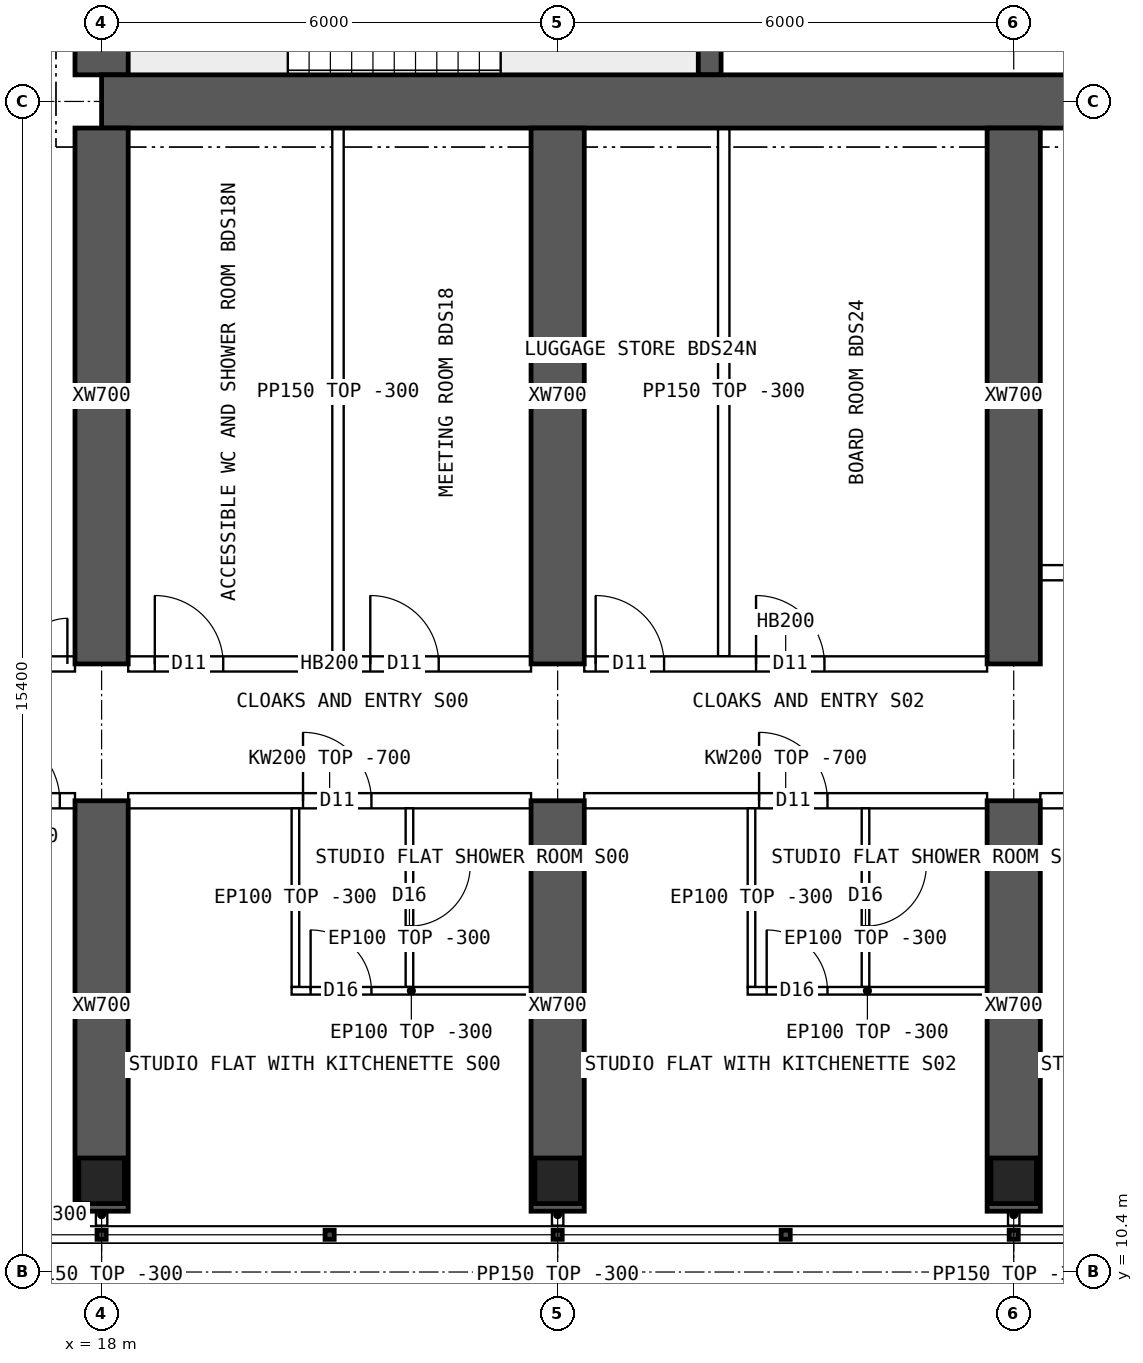
"""IFC4 building model, lengths in metres.
Left out: names, types, materials, properties, quantities, classifications, styles, units other than length and angle.
Written with IfcOpenShell. Run it as: python <this file> out.ifc"""

import sys

from ifc_helpers import new_model, si_unit, direction, frame, frame_2d, origin, origin_2d, place, context, subcontext, project, spatial, polyline, rectangle, hollow_rectangle, outline, extrude, element, fill, save


model = new_model("IFC4")
c1 = context("Model", 3, precision=1e-05, world=origin(), true_north=direction((0.0, 1.0)))
c2 = subcontext(c1, "Body", "Model", "MODEL_VIEW")
j1 = project(units=[si_unit("LENGTHUNIT", "METRE"), si_unit("PLANEANGLEUNIT", "RADIAN")], contexts=[c1])
p1 = place(None, origin())
s1 = spatial("IfcSite", under=j1, at=p1, CompositionType="ELEMENT")
p2 = place(p1, origin())
s2 = spatial("IfcBuilding", under=s1, at=p2, CompositionType="ELEMENT")
p3 = place(p2, frame((0.0, 0.0, 254.05)))
s3 = spatial("IfcBuildingStorey", under=s2, at=p3, CompositionType="ELEMENT", Elevation=254.05)
for number, where, z_axis, x_axis in (
    (1, (18.0, 11.6, 0.0), (0.0, 0.0, 1.0), (1.0, 0.0, 0.0)),
    (2, (24.0, 11.6, 0.0), (0.0, 0.0, 1.0), (1.0, 0.0, 0.0)),
    (3, (30.0, 11.6, 0.0), (0.0, 0.0, 1.0), (1.0, 0.0, 0.0)),
):
    element("IfcColumn", number, at=place(p3, frame(where, z_axis=z_axis, x_axis=x_axis)), inside=s3, PredefinedType="COLUMN", context=c2, shape_type="SweptSolid", body=[
        extrude(hollow_rectangle(XDim=0.6, YDim=0.6, WallThickness=0.06, at=origin_2d()), origin(), (0.0, 0.0, 1.0), 3.75),
    ])
p4 = place(p3, frame((18.0, 25.8, 0.0), z_axis=(0.0, 0.0, 1.0), x_axis=(1.0, 0.0, 0.0)))
e4 = element("IfcWall", 4, at=p4, inside=s3, PredefinedType="SHEAR", context=c2, shape_type="SweptSolid", body=[
    extrude(rectangle(XDim=48.0, YDim=0.7, at=frame_2d((24.0, 0.0))), origin(), (0.0, 0.0, 1.0), 3.75),
])
p5 = place(p3, frame((18.0, 26.15, 0.0), z_axis=(0.0, 0.0, 1.0), x_axis=(0.0, 1.0, 0.0)))
e5 = element("IfcWall", 5, at=p5, inside=s3, PredefinedType="SHEAR", context=c2, shape_type="SweptSolid", body=[
    extrude(rectangle(XDim=11.7, YDim=0.7, at=frame_2d((5.85, 0.0))), origin(), (0.0, 0.0, 1.0), 3.75),
])
p6 = place(p5, frame((5.15, 0.0, 0.0)))
e6 = element("IfcOpeningElement", 6, at=p6, cuts=e5, PredefinedType="OPENING", context=c2, shape_type="SweptSolid", body=[
    extrude(rectangle(XDim=1.2, YDim=2.1, at=frame_2d((0.6, 1.05))), frame((0.0, 0.36, 0.0), z_axis=(0.0, -1.0, 0.0), x_axis=(1.0, 0.0, 0.0)), (0.0, 0.0, 1.0), 0.72),
])
p7 = place(p3, frame((26.0, 26.15, 0.0), z_axis=(0.0, 0.0, 1.0), x_axis=(0.0, 1.0, 0.0)))
e7 = element("IfcWall", 7, at=p7, inside=s3, PredefinedType="SHEAR", context=c2, shape_type="SweptSolid", body=[
    extrude(rectangle(XDim=4.1, YDim=0.3, at=frame_2d((2.05, 0.0))), origin(), (0.0, 0.0, 1.0), 3.75),
])
p8 = place(p3, frame((18.0, 11.2, 0.0), z_axis=(0.0, 0.0, 1.0), x_axis=(0.0, 1.0, 0.0)))
e8 = element("IfcWall", 8, at=p8, inside=s3, PredefinedType="SHEAR", context=c2, shape_type="SweptSolid", body=[
    extrude(rectangle(XDim=5.4, YDim=0.7, at=frame_2d((2.7, 0.0))), origin(), (0.0, 0.0, 1.0), 3.75),
])
p9 = place(p3, frame((18.0, 18.4, 0.0), z_axis=(0.0, 0.0, 1.0), x_axis=(0.0, 1.0, 0.0)))
e9 = element("IfcWall", 9, at=p9, inside=s3, PredefinedType="SHEAR", context=c2, shape_type="SweptSolid", body=[
    extrude(rectangle(XDim=7.05, YDim=0.7, at=frame_2d((3.525, 0.0))), origin(), (0.0, 0.0, 1.0), 3.75),
])
p10 = place(p3, frame((24.0, 11.2, 0.0), z_axis=(0.0, 0.0, 1.0), x_axis=(0.0, 1.0, 0.0)))
e10 = element("IfcWall", 10, at=p10, inside=s3, PredefinedType="SHEAR", context=c2, shape_type="SweptSolid", body=[
    extrude(rectangle(XDim=5.4, YDim=0.7, at=frame_2d((2.7, 0.0))), origin(), (0.0, 0.0, 1.0), 3.75),
])
p11 = place(p3, frame((24.0, 18.4, 0.0), z_axis=(0.0, 0.0, 1.0), x_axis=(0.0, 1.0, 0.0)))
e11 = element("IfcWall", 11, at=p11, inside=s3, PredefinedType="SHEAR", context=c2, shape_type="SweptSolid", body=[
    extrude(rectangle(XDim=7.05, YDim=0.7, at=frame_2d((3.525, 0.0))), origin(), (0.0, 0.0, 1.0), 3.75),
])
p12 = place(p3, frame((30.0, 11.2, 0.0), z_axis=(0.0, 0.0, 1.0), x_axis=(0.0, 1.0, 0.0)))
e12 = element("IfcWall", 12, at=p12, inside=s3, PredefinedType="SHEAR", context=c2, shape_type="SweptSolid", body=[
    extrude(rectangle(XDim=5.4, YDim=0.7, at=frame_2d((2.7, 0.0))), origin(), (0.0, 0.0, 1.0), 3.75),
])
p13 = place(p3, frame((30.0, 18.4, 0.0), z_axis=(0.0, 0.0, 1.0), x_axis=(0.0, 1.0, 0.0)))
e13 = element("IfcWall", 13, at=p13, inside=s3, PredefinedType="SHEAR", context=c2, shape_type="SweptSolid", body=[
    extrude(rectangle(XDim=7.05, YDim=0.7, at=frame_2d((3.525, 0.0))), origin(), (0.0, 0.0, 1.0), 3.75),
])
p14 = place(p3, frame((17.2, 11.15, 0.0), z_axis=(0.0, 0.0, 1.0), x_axis=(1.0, 0.0, 0.0)))
e14 = element("IfcWall", 14, at=p14, inside=s3, PredefinedType="SOLIDWALL", context=c2, shape_type="SweptSolid", body=[
    extrude(rectangle(XDim=0.45, YDim=0.3, at=frame_2d((0.225, 0.0))), origin(), (0.0, 0.0, 1.0), 3.45),
])
p15 = place(p3, frame((15.6, 16.6, 0.0), z_axis=(0.0, 0.0, 1.0), x_axis=(1.0, 0.0, 0.0)))
e15 = element("IfcWall", 15, at=p15, inside=s3, PredefinedType="SOLIDWALL", context=c2, shape_type="SweptSolid", body=[
    extrude(rectangle(XDim=2.05, YDim=0.2, at=frame_2d((1.025, 0.0))), origin(), (0.0, 0.0, 1.0), 3.45),
])
p16 = place(p15, frame((0.95, 0.0, 0.0)))
e16 = element("IfcOpeningElement", 16, at=p16, cuts=e15, PredefinedType="OPENING", context=c2, shape_type="SweptSolid", body=[
    extrude(rectangle(XDim=0.9, YDim=2.1, at=frame_2d((0.45, 1.05))), frame((0.0, 0.11, 0.0), z_axis=(0.0, -1.0, 0.0), x_axis=(1.0, 0.0, 0.0)), (0.0, 0.0, 1.0), 0.22),
])
p17 = place(p3, frame((15.6, 18.4, 0.0), z_axis=(0.0, 0.0, 1.0), x_axis=(1.0, 0.0, 0.0)))
e17 = element("IfcWall", 17, at=p17, inside=s3, PredefinedType="SOLIDWALL", context=c2, shape_type="SweptSolid", body=[
    extrude(rectangle(XDim=2.05, YDim=0.2, at=frame_2d((1.025, 0.0))), origin(), (0.0, 0.0, 1.0), 3.45),
])
p18 = place(p17, frame((0.75, 0.0, 0.0)))
e18 = element("IfcOpeningElement", 18, at=p18, cuts=e17, PredefinedType="OPENING", context=c2, shape_type="SweptSolid", body=[
    extrude(rectangle(XDim=1.2, YDim=2.1, at=frame_2d((0.6, 1.05))), frame((0.0, 0.11, 0.0), z_axis=(0.0, -1.0, 0.0), x_axis=(1.0, 0.0, 0.0)), (0.0, 0.0, 1.0), 0.22),
])
p19 = place(p3, frame((18.35, 16.6, 0.0), z_axis=(0.0, 0.0, 1.0), x_axis=(1.0, 0.0, 0.0)))
e19 = element("IfcWall", 19, at=p19, inside=s3, PredefinedType="SOLIDWALL", context=c2, shape_type="SweptSolid", body=[
    extrude(outline(polyline([(0.0, 0.0), (5.3, 0.0), (5.3, 3.05), (0.0, 3.05), (0.0, 0.0)])), frame((0.0, 0.1, 0.0), z_axis=(0.0, -1.0, 0.0), x_axis=(1.0, 0.0, 0.0)), (0.0, 0.0, 1.0), 0.2),
])
p20 = place(p19, frame((2.3, 0.0, 0.0)))
e20 = element("IfcOpeningElement", 20, at=p20, cuts=e19, PredefinedType="OPENING", context=c2, shape_type="SweptSolid", body=[
    extrude(rectangle(XDim=0.9, YDim=2.1, at=frame_2d((0.45, 1.05))), frame((0.0, 0.11, 0.0), z_axis=(0.0, -1.0, 0.0), x_axis=(1.0, 0.0, 0.0)), (0.0, 0.0, 1.0), 0.22),
])
p21 = place(p3, frame((18.35, 18.4, 0.0), z_axis=(0.0, 0.0, 1.0), x_axis=(1.0, 0.0, 0.0)))
e21 = element("IfcWall", 21, at=p21, inside=s3, PredefinedType="SOLIDWALL", context=c2, shape_type="SweptSolid", body=[
    extrude(rectangle(XDim=5.3, YDim=0.2, at=frame_2d((2.65, 0.0))), origin(), (0.0, 0.0, 1.0), 3.45),
])
p22 = place(p21, frame((0.35, 0.0, 0.0)))
e22 = element("IfcOpeningElement", 22, at=p22, cuts=e21, PredefinedType="OPENING", context=c2, shape_type="SweptSolid", body=[
    extrude(rectangle(XDim=0.9, YDim=2.1, at=frame_2d((0.45, 1.05))), frame((0.0, 0.11, 0.0), z_axis=(0.0, -1.0, 0.0), x_axis=(1.0, 0.0, 0.0)), (0.0, 0.0, 1.0), 0.22),
])
p23 = place(p21, frame((3.185, 0.0, 0.0)))
e23 = element("IfcOpeningElement", 23, at=p23, cuts=e21, PredefinedType="OPENING", context=c2, shape_type="SweptSolid", body=[
    extrude(rectangle(XDim=0.9, YDim=2.1, at=frame_2d((0.45, 1.05))), frame((0.0, 0.11, 0.0), z_axis=(0.0, -1.0, 0.0), x_axis=(1.0, 0.0, 0.0)), (0.0, 0.0, 1.0), 0.22),
])
p24 = place(p3, frame((24.35, 16.6, 0.0), z_axis=(0.0, 0.0, 1.0), x_axis=(1.0, 0.0, 0.0)))
e24 = element("IfcWall", 24, at=p24, inside=s3, PredefinedType="SOLIDWALL", context=c2, shape_type="SweptSolid", body=[
    extrude(outline(polyline([(0.0, 0.0), (5.3, 0.0), (5.3, 3.05), (0.0, 3.05), (0.0, 0.0)])), frame((0.0, 0.1, 0.0), z_axis=(0.0, -1.0, 0.0), x_axis=(1.0, 0.0, 0.0)), (0.0, 0.0, 1.0), 0.2),
])
p25 = place(p24, frame((2.3, 0.0, 0.0)))
e25 = element("IfcOpeningElement", 25, at=p25, cuts=e24, PredefinedType="OPENING", context=c2, shape_type="SweptSolid", body=[
    extrude(rectangle(XDim=0.9, YDim=2.1, at=frame_2d((0.45, 1.05))), frame((0.0, 0.11, 0.0), z_axis=(0.0, -1.0, 0.0), x_axis=(1.0, 0.0, 0.0)), (0.0, 0.0, 1.0), 0.22),
])
p26 = place(p3, frame((24.35, 18.4, 0.0), z_axis=(0.0, 0.0, 1.0), x_axis=(1.0, 0.0, 0.0)))
e26 = element("IfcWall", 26, at=p26, inside=s3, PredefinedType="SOLIDWALL", context=c2, shape_type="SweptSolid", body=[
    extrude(rectangle(XDim=5.3, YDim=0.2, at=frame_2d((2.65, 0.0))), origin(), (0.0, 0.0, 1.0), 3.45),
])
p27 = place(p26, frame((0.15, 0.0, 0.0)))
e27 = element("IfcOpeningElement", 27, at=p27, cuts=e26, PredefinedType="OPENING", context=c2, shape_type="SweptSolid", body=[
    extrude(rectangle(XDim=0.9, YDim=2.1, at=frame_2d((0.45, 1.05))), frame((0.0, 0.11, 0.0), z_axis=(0.0, -1.0, 0.0), x_axis=(1.0, 0.0, 0.0)), (0.0, 0.0, 1.0), 0.22),
])
p28 = place(p26, frame((2.26, 0.0, 0.0)))
e28 = element("IfcOpeningElement", 28, at=p28, cuts=e26, PredefinedType="OPENING", context=c2, shape_type="SweptSolid", body=[
    extrude(rectangle(XDim=0.9, YDim=2.1, at=frame_2d((0.45, 1.05))), frame((0.0, 0.11, 0.0), z_axis=(0.0, -1.0, 0.0), x_axis=(1.0, 0.0, 0.0)), (0.0, 0.0, 1.0), 0.22),
])
p29 = place(p3, frame((30.35, 16.6, 0.0), z_axis=(0.0, 0.0, 1.0), x_axis=(1.0, 0.0, 0.0)))
e29 = element("IfcWall", 29, at=p29, inside=s3, PredefinedType="SOLIDWALL", context=c2, shape_type="SweptSolid", body=[
    extrude(outline(polyline([(0.0, 0.0), (5.3, 0.0), (5.3, 3.05), (0.0, 3.05), (0.0, 0.0)])), frame((0.0, 0.1, 0.0), z_axis=(0.0, -1.0, 0.0), x_axis=(1.0, 0.0, 0.0)), (0.0, 0.0, 1.0), 0.2),
])
p30 = place(p29, frame((2.3, 0.0, 0.0)))
e30 = element("IfcOpeningElement", 30, at=p30, cuts=e29, PredefinedType="OPENING", context=c2, shape_type="SweptSolid", body=[
    extrude(rectangle(XDim=0.9, YDim=2.1, at=frame_2d((0.45, 1.05))), frame((0.0, 0.11, 0.0), z_axis=(0.0, -1.0, 0.0), x_axis=(1.0, 0.0, 0.0)), (0.0, 0.0, 1.0), 0.22),
])
p31 = place(p3, frame((23.65, 14.1, 0.0), z_axis=(0.0, 0.0, 1.0), x_axis=(-1.0, 0.0, 0.0)))
e31 = element("IfcWall", 31, at=p31, inside=s3, PredefinedType="PARTITIONING", context=c2, shape_type="SweptSolid", body=[
    extrude(rectangle(XDim=3.15, YDim=0.1, at=frame_2d((1.575, 0.0))), origin(), (0.0, 0.0, 1.0), 3.45),
])
p32 = place(p31, frame((2.1, 0.0, 0.0)))
e32 = element("IfcOpeningElement", 32, at=p32, cuts=e31, PredefinedType="OPENING", context=c2, shape_type="SweptSolid", body=[
    extrude(rectangle(XDim=0.8, YDim=2.1, at=frame_2d((0.4, 1.05))), frame((0.0, 0.06, 0.0), z_axis=(0.0, -1.0, 0.0), x_axis=(1.0, 0.0, 0.0)), (0.0, 0.0, 1.0), 0.12),
])
p33 = place(p3, frame((20.55, 14.15, 0.0), z_axis=(0.0, 0.0, 1.0), x_axis=(0.0, 1.0, 0.0)))
e33 = element("IfcWall", 33, at=p33, inside=s3, PredefinedType="PARTITIONING", context=c2, shape_type="SweptSolid", body=[
    extrude(outline(polyline([(0.0, 0.0), (2.35, 0.0), (2.35, 3.05), (2.302, 3.05), (2.3, 3.45), (0.0, 3.45), (0.0, 0.0)])), frame((0.0, 0.05, 0.0), z_axis=(0.0, -1.0, 0.0), x_axis=(1.0, 0.0, 0.0)), (0.0, 0.0, 1.0), 0.1),
])
p34 = place(p3, frame((22.05, 14.15, 0.0), z_axis=(0.0, 0.0, 1.0), x_axis=(0.0, 1.0, 0.0)))
e34 = element("IfcWall", 34, at=p34, inside=s3, PredefinedType="PARTITIONING", context=c2, shape_type="SweptSolid", body=[
    extrude(outline(polyline([(0.0, 0.0), (2.35, 0.0), (2.35, 3.05), (2.302, 3.05), (2.3, 3.45), (0.0, 3.45), (0.0, 0.0)])), frame((0.0, 0.05, 0.0), z_axis=(0.0, -1.0, 0.0), x_axis=(1.0, 0.0, 0.0)), (0.0, 0.0, 1.0), 0.1),
])
p35 = place(p34, frame((0.8, 0.0, 0.0)))
e35 = element("IfcOpeningElement", 35, at=p35, cuts=e34, PredefinedType="OPENING", context=c2, shape_type="SweptSolid", body=[
    extrude(rectangle(XDim=0.8, YDim=2.1, at=frame_2d((0.4, 1.05))), frame((0.0, 0.06, 0.0), z_axis=(0.0, -1.0, 0.0), x_axis=(1.0, 0.0, 0.0)), (0.0, 0.0, 1.0), 0.12),
])
p36 = place(p3, frame((29.65, 14.1, 0.0), z_axis=(0.0, 0.0, 1.0), x_axis=(-1.0, 0.0, 0.0)))
e36 = element("IfcWall", 36, at=p36, inside=s3, PredefinedType="PARTITIONING", context=c2, shape_type="SweptSolid", body=[
    extrude(rectangle(XDim=3.15, YDim=0.1, at=frame_2d((1.575, 0.0))), origin(), (0.0, 0.0, 1.0), 3.45),
])
p37 = place(p36, frame((2.1, 0.0, 0.0)))
e37 = element("IfcOpeningElement", 37, at=p37, cuts=e36, PredefinedType="OPENING", context=c2, shape_type="SweptSolid", body=[
    extrude(rectangle(XDim=0.8, YDim=2.1, at=frame_2d((0.4, 1.05))), frame((0.0, 0.06, 0.0), z_axis=(0.0, -1.0, 0.0), x_axis=(1.0, 0.0, 0.0)), (0.0, 0.0, 1.0), 0.12),
])
p38 = place(p3, frame((26.55, 14.15, 0.0), z_axis=(0.0, 0.0, 1.0), x_axis=(0.0, 1.0, 0.0)))
e38 = element("IfcWall", 38, at=p38, inside=s3, PredefinedType="PARTITIONING", context=c2, shape_type="SweptSolid", body=[
    extrude(outline(polyline([(0.0, 0.0), (2.35, 0.0), (2.35, 3.05), (2.302, 3.05), (2.3, 3.45), (0.0, 3.45), (0.0, 0.0)])), frame((0.0, 0.05, 0.0), z_axis=(0.0, -1.0, 0.0), x_axis=(1.0, 0.0, 0.0)), (0.0, 0.0, 1.0), 0.1),
])
p39 = place(p3, frame((28.05, 14.15, 0.0), z_axis=(0.0, 0.0, 1.0), x_axis=(0.0, 1.0, 0.0)))
e39 = element("IfcWall", 39, at=p39, inside=s3, PredefinedType="PARTITIONING", context=c2, shape_type="SweptSolid", body=[
    extrude(outline(polyline([(0.0, 0.0), (2.35, 0.0), (2.35, 3.05), (2.302, 3.05), (2.3, 3.45), (0.0, 3.45), (0.0, 0.0)])), frame((0.0, 0.05, 0.0), z_axis=(0.0, -1.0, 0.0), x_axis=(1.0, 0.0, 0.0)), (0.0, 0.0, 1.0), 0.1),
])
p40 = place(p39, frame((0.8, 0.0, 0.0)))
e40 = element("IfcOpeningElement", 40, at=p40, cuts=e39, PredefinedType="OPENING", context=c2, shape_type="SweptSolid", body=[
    extrude(rectangle(XDim=0.8, YDim=2.1, at=frame_2d((0.4, 1.05))), frame((0.0, 0.06, 0.0), z_axis=(0.0, -1.0, 0.0), x_axis=(1.0, 0.0, 0.0)), (0.0, 0.0, 1.0), 0.12),
])
for number, where, z_axis, x_axis in (
    (41, (21.11, 18.5, 0.0), (0.0, 0.0, 1.0), (0.0, 1.0, 0.0)),
    (42, (26.185, 18.5, 0.0), (0.0, 0.0, 1.0), (0.0, 1.0, 0.0)),
):
    element("IfcWall", number, at=place(p3, frame(where, z_axis=z_axis, x_axis=x_axis)), inside=s3, PredefinedType="PARTITIONING", context=c2, shape_type="SweptSolid", body=[
        extrude(rectangle(XDim=6.95, YDim=0.15, at=frame_2d((3.475, 0.0))), origin(), (0.0, 0.0, 1.0), 3.45),
    ])
p41 = place(p3, frame((30.35, 19.6, 0.0), z_axis=(0.0, 0.0, 1.0), x_axis=(1.0, 0.0, 0.0)))
e43 = element("IfcWall", 43, at=p41, inside=s3, PredefinedType="SOLIDWALL", context=c2, shape_type="SweptSolid", body=[
    extrude(rectangle(XDim=5.3, YDim=0.2, at=frame_2d((2.65, 0.0))), origin(), (0.0, 0.0, 1.0), 3.45),
])
p42 = place(p41, frame((0.8, 0.0, 0.0)))
e44 = element("IfcOpeningElement", 44, at=p42, cuts=e43, PredefinedType="OPENING", context=c2, shape_type="SweptSolid", body=[
    extrude(rectangle(XDim=1.0, YDim=2.1, at=frame_2d((0.5, 1.05))), frame((0.0, 0.11, 0.0), z_axis=(0.0, -1.0, 0.0), x_axis=(1.0, 0.0, 0.0)), (0.0, 0.0, 1.0), 0.22),
])
for number, where, z_axis, x_axis in (
    (45, (18.0, 11.3, 0.0), (0.0, 0.0, 1.0), (0.0, -1.0, 0.0)),
    (46, (24.0, 11.3, 0.0), (0.0, 0.0, 1.0), (0.0, -1.0, 0.0)),
    (47, (30.0, 11.3, 0.0), (0.0, 0.0, 1.0), (0.0, -1.0, 0.0)),
):
    element("IfcWall", number, at=place(p3, frame(where, z_axis=z_axis, x_axis=x_axis)), inside=s3, PredefinedType="PARTITIONING", context=c2, shape_type="SweptSolid", body=[
        extrude(rectangle(XDim=0.29, YDim=0.15, at=frame_2d((0.145, 0.0))), origin(), (0.0, 0.0, 1.0), 3.45),
    ])
p43 = place(p18, origin())
e48 = element("IfcDoor", 48, at=p43, inside=s3, OperationType="DOUBLE_DOOR_SINGLE_SWING", PredefinedType="DOOR", context=c2, shape_type="SweptSolid", body=[
    extrude(rectangle(XDim=1.2, YDim=2.1, at=frame_2d((0.6, 1.05))), frame((0.0, 0.025, 0.0), z_axis=(0.0, -1.0, 0.0), x_axis=(1.0, 0.0, 0.0)), (0.0, 0.0, 1.0), 0.05),
])
fill(e18, e48)
p44 = place(p32, origin())
e49 = element("IfcDoor", 49, at=p44, inside=s3, OperationType="SINGLE_SWING_RIGHT", PredefinedType="DOOR", context=c2, shape_type="SweptSolid", body=[
    extrude(rectangle(XDim=0.8, YDim=2.1, at=frame_2d((0.4, 1.05))), frame((0.0, 0.025, 0.0), z_axis=(0.0, -1.0, 0.0), x_axis=(1.0, 0.0, 0.0)), (0.0, 0.0, 1.0), 0.05),
])
fill(e32, e49)
p45 = place(p35, origin())
e50 = element("IfcDoor", 50, at=p45, inside=s3, OperationType="SINGLE_SWING_RIGHT", PredefinedType="DOOR", context=c2, shape_type="SweptSolid", body=[
    extrude(rectangle(XDim=0.8, YDim=2.1, at=frame_2d((0.4, 1.05))), frame((0.0, 0.025, 0.0), z_axis=(0.0, -1.0, 0.0), x_axis=(1.0, 0.0, 0.0)), (0.0, 0.0, 1.0), 0.05),
])
fill(e35, e50)
p46 = place(p20, origin())
e51 = element("IfcDoor", 51, at=p46, inside=s3, OperationType="SINGLE_SWING_LEFT", PredefinedType="DOOR", context=c2, shape_type="SweptSolid", body=[
    extrude(rectangle(XDim=0.9, YDim=2.1, at=frame_2d((0.45, 1.05))), frame((0.0, 0.025, 0.0), z_axis=(0.0, -1.0, 0.0), x_axis=(1.0, 0.0, 0.0)), (0.0, 0.0, 1.0), 0.05),
])
fill(e20, e51)
p47 = place(p37, origin())
e52 = element("IfcDoor", 52, at=p47, inside=s3, OperationType="SINGLE_SWING_RIGHT", PredefinedType="DOOR", context=c2, shape_type="SweptSolid", body=[
    extrude(rectangle(XDim=0.8, YDim=2.1, at=frame_2d((0.4, 1.05))), frame((0.0, 0.025, 0.0), z_axis=(0.0, -1.0, 0.0), x_axis=(1.0, 0.0, 0.0)), (0.0, 0.0, 1.0), 0.05),
])
fill(e37, e52)
p48 = place(p40, origin())
e53 = element("IfcDoor", 53, at=p48, inside=s3, OperationType="SINGLE_SWING_RIGHT", PredefinedType="DOOR", context=c2, shape_type="SweptSolid", body=[
    extrude(rectangle(XDim=0.8, YDim=2.1, at=frame_2d((0.4, 1.05))), frame((0.0, 0.025, 0.0), z_axis=(0.0, -1.0, 0.0), x_axis=(1.0, 0.0, 0.0)), (0.0, 0.0, 1.0), 0.05),
])
fill(e40, e53)
p49 = place(p25, origin())
e54 = element("IfcDoor", 54, at=p49, inside=s3, OperationType="SINGLE_SWING_LEFT", PredefinedType="DOOR", context=c2, shape_type="SweptSolid", body=[
    extrude(rectangle(XDim=0.9, YDim=2.1, at=frame_2d((0.45, 1.05))), frame((0.0, 0.025, 0.0), z_axis=(0.0, -1.0, 0.0), x_axis=(1.0, 0.0, 0.0)), (0.0, 0.0, 1.0), 0.05),
])
fill(e25, e54)
p50 = place(p22, origin())
e55 = element("IfcDoor", 55, at=p50, inside=s3, OperationType="SINGLE_SWING_LEFT", PredefinedType="DOOR", context=c2, shape_type="SweptSolid", body=[
    extrude(rectangle(XDim=0.9, YDim=2.1, at=frame_2d((0.45, 1.05))), frame((0.0, 0.025, 0.0), z_axis=(0.0, -1.0, 0.0), x_axis=(1.0, 0.0, 0.0)), (0.0, 0.0, 1.0), 0.05),
])
fill(e22, e55)
p51 = place(p23, origin())
e56 = element("IfcDoor", 56, at=p51, inside=s3, OperationType="SINGLE_SWING_LEFT", PredefinedType="DOOR", context=c2, shape_type="SweptSolid", body=[
    extrude(rectangle(XDim=0.9, YDim=2.1, at=frame_2d((0.45, 1.05))), frame((0.0, 0.025, 0.0), z_axis=(0.0, -1.0, 0.0), x_axis=(1.0, 0.0, 0.0)), (0.0, 0.0, 1.0), 0.05),
])
fill(e23, e56)
p52 = place(p27, origin())
e57 = element("IfcDoor", 57, at=p52, inside=s3, OperationType="SINGLE_SWING_LEFT", PredefinedType="DOOR", context=c2, shape_type="SweptSolid", body=[
    extrude(rectangle(XDim=0.9, YDim=2.1, at=frame_2d((0.45, 1.05))), frame((0.0, 0.025, 0.0), z_axis=(0.0, -1.0, 0.0), x_axis=(1.0, 0.0, 0.0)), (0.0, 0.0, 1.0), 0.05),
])
fill(e27, e57)
p53 = place(p28, origin())
e58 = element("IfcDoor", 58, at=p53, inside=s3, OperationType="SINGLE_SWING_LEFT", PredefinedType="DOOR", context=c2, shape_type="SweptSolid", body=[
    extrude(rectangle(XDim=0.9, YDim=2.1, at=frame_2d((0.45, 1.05))), frame((0.0, 0.025, 0.0), z_axis=(0.0, -1.0, 0.0), x_axis=(1.0, 0.0, 0.0)), (0.0, 0.0, 1.0), 0.05),
])
fill(e28, e58)
p54 = place(p16, origin())
e59 = element("IfcDoor", 59, at=p54, inside=s3, OperationType="SINGLE_SWING_LEFT", PredefinedType="DOOR", context=c2, shape_type="SweptSolid", body=[
    extrude(rectangle(XDim=0.9, YDim=2.1, at=frame_2d((0.45, 1.05))), frame((0.0, 0.025, 0.0), z_axis=(0.0, -1.0, 0.0), x_axis=(1.0, 0.0, 0.0)), (0.0, 0.0, 1.0), 0.05),
])
fill(e16, e59)
save(model, sys.argv[1])
